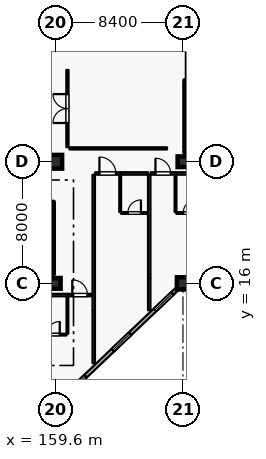
"""IFC4 building model, lengths in metres.
Left out: names, types, materials, properties, quantities, classifications, styles, units other than length and angle.
Written with IfcOpenShell. Run it as: python <this file> out.ifc"""

import sys

from ifc_helpers import new_model, si_unit, direction, frame, frame_2d, origin, origin_2d, place, context, subcontext, project, spatial, rectangle, extrude, element, fill, save


model = new_model("IFC4")
c1 = context("Model", 3, precision=1e-05, world=origin(), true_north=direction((0.0, 1.0)))
c2 = subcontext(c1, "Body", "Model", "MODEL_VIEW")
j1 = project(units=[si_unit("LENGTHUNIT", "METRE"), si_unit("PLANEANGLEUNIT", "RADIAN")], contexts=[c1])
p1 = place(None, origin())
s1 = spatial("IfcSite", under=j1, at=p1, CompositionType="ELEMENT")
p2 = place(p1, origin())
s2 = spatial("IfcBuilding", under=s1, at=p2, CompositionType="ELEMENT")
p3 = place(p2, frame((0.0, 0.0, 11.4)))
s3 = spatial("IfcBuildingStorey", under=s2, at=p3, CompositionType="ELEMENT", Elevation=11.4)
p4 = place(p3, frame((159.6, 24.0, 0.0), z_axis=(0.0, 0.0, 1.0), x_axis=(1.0, 0.0, 0.0)))
e1 = element("IfcColumn", 1, at=p4, inside=s3, PredefinedType="COLUMN", context=c2, shape_type="SweptSolid", body=[
    extrude(rectangle(XDim=0.9, YDim=0.9, at=origin_2d()), origin(), (0.0, 0.0, 1.0), 4.8),
])
p5 = place(p3, frame((168.0, 16.0, 0.0), z_axis=(0.0, 0.0, 1.0), x_axis=(1.0, 0.0, 0.0)))
e2 = element("IfcColumn", 2, at=p5, inside=s3, PredefinedType="COLUMN", context=c2, shape_type="SweptSolid", body=[
    extrude(rectangle(XDim=0.8, YDim=0.8, at=origin_2d()), origin(), (0.0, 0.0, 1.0), 4.8),
])
for number, where, z_axis, x_axis in (
    (3, (159.6, 16.0, 0.0), (0.0, 0.0, 1.0), (1.0, 0.0, 0.0)),
    (4, (168.0, 24.0, 0.0), (0.0, 0.0, 1.0), (1.0, 0.0, 0.0)),
):
    element("IfcColumn", number, at=place(p3, frame(where, z_axis=z_axis, x_axis=x_axis)), inside=s3, PredefinedType="COLUMN", context=c2, shape_type="SweptSolid", body=[
        extrude(rectangle(XDim=0.7, YDim=0.7, at=origin_2d()), origin(), (0.0, 0.0, 1.0), 4.8),
    ])
p6 = place(p3, frame((167.6, 15.619, 0.0), z_axis=(0.0, 0.0, 1.0), x_axis=(-0.724156739794, -0.689635422677, 0.0)))
e5 = element("IfcWall", 5, at=p6, inside=s3, PredefinedType="SOLIDWALL", context=c2, shape_type="SweptSolid", body=[
    extrude(rectangle(XDim=10.495, YDim=0.24, at=frame_2d((5.248, 0.0))), origin(), (0.0, 0.0, 1.0), 4.13),
])
p7 = place(p6, frame((0.388, 0.0, 0.8)))
e6 = element("IfcOpeningElement", 6, at=p7, cuts=e5, PredefinedType="OPENING", context=c2, shape_type="SweptSolid", body=[
    extrude(rectangle(XDim=1.6, YDim=1.6, at=frame_2d((0.8, 0.8))), frame((0.0, 0.13, 0.0), z_axis=(0.0, -1.0, 0.0), x_axis=(1.0, 0.0, 0.0)), (0.0, 0.0, 1.0), 0.26),
])
p8 = place(p6, frame((4.234, 0.0, 0.8)))
e7 = element("IfcOpeningElement", 7, at=p8, cuts=e5, PredefinedType="OPENING", context=c2, shape_type="SweptSolid", body=[
    extrude(rectangle(XDim=1.6, YDim=1.6, at=frame_2d((0.8, 0.8))), frame((0.0, 0.13, 0.0), z_axis=(0.0, -1.0, 0.0), x_axis=(1.0, 0.0, 0.0)), (0.0, 0.0, 1.0), 0.26),
])
p9 = place(p6, frame((8.294, 0.0, 0.8)))
e8 = element("IfcOpeningElement", 8, at=p9, cuts=e5, PredefinedType="OPENING", context=c2, shape_type="SweptSolid", body=[
    extrude(rectangle(XDim=1.6, YDim=1.6, at=frame_2d((0.8, 0.8))), frame((0.0, 0.13, 0.0), z_axis=(0.0, -1.0, 0.0), x_axis=(1.0, 0.0, 0.0)), (0.0, 0.0, 1.0), 0.26),
])
p10 = place(p3, frame((151.3, 16.8, 0.0), z_axis=(0.0, 0.0, 1.0), x_axis=(1.0, 0.0, 0.0)))
e9 = element("IfcWall", 9, at=p10, inside=s3, PredefinedType="SHEAR", context=c2, shape_type="SweptSolid", body=[
    extrude(rectangle(XDim=8.2, YDim=0.4, at=frame_2d((4.1, 0.0))), origin(), (0.0, 0.0, 1.0), 4.535),
])
p11 = place(p3, frame((159.3, 17.005, 0.0), z_axis=(0.0, 0.0, 1.0), x_axis=(0.0, 1.0, 0.0)))
e10 = element("IfcWall", 10, at=p11, inside=s3, PredefinedType="SHEAR", context=c2, shape_type="SweptSolid", body=[
    extrude(rectangle(XDim=3.95, YDim=0.4, at=frame_2d((1.975, 0.0))), origin(), (0.0, 0.0, 1.0), 4.535),
])
p12 = place(p3, frame((151.3, 21.16, 0.0), z_axis=(0.0, 0.0, 1.0), x_axis=(1.0, 0.0, 0.0)))
e11 = element("IfcWall", 11, at=p12, inside=s3, PredefinedType="SHEAR", context=c2, shape_type="SweptSolid", body=[
    extrude(rectangle(XDim=8.2, YDim=0.4, at=frame_2d((4.1, 0.0))), origin(), (0.0, 0.0, 1.0), 4.535),
])
p13 = place(p12, frame((0.43, 0.0, 0.0)))
e12 = element("IfcOpeningElement", 12, at=p13, cuts=e11, PredefinedType="OPENING", context=c2, shape_type="SweptSolid", body=[
    extrude(rectangle(XDim=1.16, YDim=2.2, at=frame_2d((0.58, 1.1))), frame((0.0, 0.21, 0.0), z_axis=(0.0, -1.0, 0.0), x_axis=(1.0, 0.0, 0.0)), (0.0, 0.0, 1.0), 0.42),
])
p14 = place(p3, frame((168.1, 24.8, 0.0), z_axis=(0.0, 0.0, 1.0), x_axis=(1.0, 0.0, 0.0)))
e13 = element("IfcWall", 13, at=p14, inside=s3, PredefinedType="SHEAR", context=c2, shape_type="SweptSolid", body=[
    extrude(rectangle(XDim=8.2, YDim=0.4, at=frame_2d((4.1, 0.0))), origin(), (0.0, 0.0, 1.0), 4.535),
])
p15 = place(p3, frame((168.1, 29.16, 0.0), z_axis=(0.0, 0.0, 1.0), x_axis=(1.0, 0.0, 0.0)))
e14 = element("IfcWall", 14, at=p15, inside=s3, PredefinedType="SHEAR", context=c2, shape_type="SweptSolid", body=[
    extrude(rectangle(XDim=8.2, YDim=0.4, at=frame_2d((4.1, 0.0))), origin(), (0.0, 0.0, 1.0), 4.535),
])
p16 = place(p15, frame((0.43, 0.0, 0.0)))
e15 = element("IfcOpeningElement", 15, at=p16, cuts=e14, PredefinedType="OPENING", context=c2, shape_type="SweptSolid", body=[
    extrude(rectangle(XDim=1.16, YDim=2.2, at=frame_2d((0.58, 1.1))), frame((0.0, 0.21, 0.0), z_axis=(0.0, -1.0, 0.0), x_axis=(1.0, 0.0, 0.0)), (0.0, 0.0, 1.0), 0.42),
])
p17 = place(p3, frame((168.3, 25.005, 0.0), z_axis=(0.0, 0.0, 1.0), x_axis=(0.0, 1.0, 0.0)))
e16 = element("IfcWall", 16, at=p17, inside=s3, PredefinedType="SHEAR", context=c2, shape_type="SweptSolid", body=[
    extrude(rectangle(XDim=3.95, YDim=0.4, at=frame_2d((1.975, 0.0))), origin(), (0.0, 0.0, 1.0), 4.535),
])
p18 = place(p3, frame((168.3, 29.365, 0.0), z_axis=(0.0, 0.0, 1.0), x_axis=(0.0, 1.0, 0.0)))
e17 = element("IfcWall", 17, at=p18, inside=s3, PredefinedType="PARTITIONING", context=c2, shape_type="SweptSolid", body=[
    extrude(rectangle(XDim=2.92, YDim=0.22, at=frame_2d((1.46, 0.0))), origin(), (0.0, 0.0, 1.0), 4.535),
])
p19 = place(p3, frame((158.58, 15.23, 0.0), z_axis=(0.0, 0.0, 1.0), x_axis=(1.0, 0.0, 0.0)))
e18 = element("IfcWall", 18, at=p19, inside=s3, PredefinedType="PARTITIONING", context=c2, shape_type="SweptSolid", body=[
    extrude(rectangle(XDim=1.81, YDim=0.16, at=frame_2d((0.905, 0.0))), origin(), (0.0, 0.0, 1.0), 4.535),
])
p20 = place(p3, frame((160.4, 15.23, 0.0), z_axis=(0.0, 0.0, 1.0), x_axis=(1.0, 0.0, 0.0)))
e19 = element("IfcWall", 19, at=p20, inside=s3, PredefinedType="PARTITIONING", context=c2, shape_type="SweptSolid", body=[
    extrude(rectangle(XDim=1.64, YDim=0.16, at=frame_2d((0.82, 0.0))), origin(), (0.0, 0.0, 1.0), 4.535),
])
p21 = place(p20, frame((0.32, 0.0, 0.0)))
e20 = element("IfcOpeningElement", 20, at=p21, cuts=e19, PredefinedType="OPENING", context=c2, shape_type="SweptSolid", body=[
    extrude(rectangle(XDim=1.0, YDim=2.25, at=frame_2d((0.5, 1.125))), frame((0.0, 0.09, 0.0), z_axis=(0.0, -1.0, 0.0), x_axis=(1.0, 0.0, 0.0)), (0.0, 0.0, 1.0), 0.18),
])
p22 = place(p3, frame((160.4, 12.69, 0.0), z_axis=(0.0, 0.0, 1.0), x_axis=(0.0, 1.0, 0.0)))
e21 = element("IfcWall", 21, at=p22, inside=s3, PredefinedType="PARTITIONING", context=c2, shape_type="SweptSolid", body=[
    extrude(rectangle(XDim=2.45, YDim=0.115, at=frame_2d((1.225, 0.0))), origin(), (0.0, 0.0, 1.0), 4.535),
])
p23 = place(p3, frame((158.59, 12.63, 0.0), z_axis=(0.0, 0.0, 1.0), x_axis=(1.0, 0.0, 0.0)))
e22 = element("IfcWall", 22, at=p23, inside=s3, PredefinedType="PARTITIONING", context=c2, shape_type="SweptSolid", body=[
    extrude(rectangle(XDim=1.75, YDim=0.115, at=frame_2d((0.875, 0.0))), origin(), (0.0, 0.0, 1.0), 4.535),
])
p24 = place(p23, frame((0.445, 0.0, 0.0)))
e23 = element("IfcOpeningElement", 23, at=p24, cuts=e22, PredefinedType="OPENING", context=c2, shape_type="SweptSolid", body=[
    extrude(rectangle(XDim=0.86, YDim=2.12, at=frame_2d((0.43, 1.06))), frame((0.0, 0.067, 0.0), z_axis=(0.0, -1.0, 0.0), x_axis=(1.0, 0.0, 0.0)), (0.0, 0.0, 1.0), 0.135),
])
p25 = place(p3, frame((162.13, 10.75, 0.0), z_axis=(0.0, 0.0, 1.0), x_axis=(0.0, 1.0, 0.0)))
e24 = element("IfcWall", 24, at=p25, inside=s3, PredefinedType="PARTITIONING", context=c2, shape_type="SweptSolid", body=[
    extrude(rectangle(XDim=3.47, YDim=0.16, at=frame_2d((1.735, 0.0))), origin(), (0.0, 0.0, 1.0), 4.535),
])
p26 = place(p3, frame((162.22, 23.23, 0.0), z_axis=(0.0, 0.0, 1.0), x_axis=(1.0, 0.0, 0.0)))
e25 = element("IfcWall", 25, at=p26, inside=s3, PredefinedType="PARTITIONING", context=c2, shape_type="SweptSolid", body=[
    extrude(rectangle(XDim=1.65, YDim=0.16, at=frame_2d((0.825, 0.0))), origin(), (0.0, 0.0, 1.0), 4.535),
])
p27 = place(p26, frame((0.285, 0.0, 0.0)))
e26 = element("IfcOpeningElement", 26, at=p27, cuts=e25, PredefinedType="OPENING", context=c2, shape_type="SweptSolid", body=[
    extrude(rectangle(XDim=1.08, YDim=2.3, at=frame_2d((0.54, 1.15))), frame((0.0, 0.09, 0.0), z_axis=(0.0, -1.0, 0.0), x_axis=(1.0, 0.0, 0.0)), (0.0, 0.0, 1.0), 0.18),
])
p28 = place(p3, frame((163.88, 23.23, 0.0), z_axis=(0.0, 0.0, 1.0), x_axis=(1.0, 0.0, 0.0)))
e27 = element("IfcWall", 27, at=p28, inside=s3, PredefinedType="PARTITIONING", context=c2, shape_type="SweptSolid", body=[
    extrude(rectangle(XDim=1.81, YDim=0.16, at=frame_2d((0.905, 0.0))), origin(), (0.0, 0.0, 1.0), 4.535),
])
p29 = place(p3, frame((163.87, 20.69, 0.0), z_axis=(0.0, 0.0, 1.0), x_axis=(0.0, 1.0, 0.0)))
e28 = element("IfcWall", 28, at=p29, inside=s3, PredefinedType="PARTITIONING", context=c2, shape_type="SweptSolid", body=[
    extrude(rectangle(XDim=2.45, YDim=0.115, at=frame_2d((1.225, 0.0))), origin(), (0.0, 0.0, 1.0), 4.535),
])
p30 = place(p3, frame((163.93, 20.63, 0.0), z_axis=(0.0, 0.0, 1.0), x_axis=(1.0, 0.0, 0.0)))
e29 = element("IfcWall", 29, at=p30, inside=s3, PredefinedType="PARTITIONING", context=c2, shape_type="SweptSolid", body=[
    extrude(rectangle(XDim=1.75, YDim=0.115, at=frame_2d((0.875, 0.0))), origin(), (0.0, 0.0, 1.0), 4.535),
])
p31 = place(p30, frame((0.445, 0.0, 0.0)))
e30 = element("IfcOpeningElement", 30, at=p31, cuts=e29, PredefinedType="OPENING", context=c2, shape_type="SweptSolid", body=[
    extrude(rectangle(XDim=0.86, YDim=2.12, at=frame_2d((0.43, 1.06))), frame((0.0, 0.067, 0.0), z_axis=(0.0, -1.0, 0.0), x_axis=(1.0, 0.0, 0.0)), (0.0, 0.0, 1.0), 0.135),
])
p32 = place(p3, frame((162.13, 14.23, 0.0), z_axis=(0.0, 0.0, 1.0), x_axis=(0.0, 1.0, 0.0)))
e31 = element("IfcWall", 31, at=p32, inside=s3, PredefinedType="PARTITIONING", context=c2, shape_type="SweptSolid", body=[
    extrude(rectangle(XDim=8.91, YDim=0.16, at=frame_2d((4.455, 0.0))), origin(), (0.0, 0.0, 1.0), 4.535),
])
p33 = place(p3, frame((165.78, 14.23, 0.0), z_axis=(0.0, 0.0, 1.0), x_axis=(0.0, 1.0, 0.0)))
e32 = element("IfcWall", 32, at=p33, inside=s3, PredefinedType="PARTITIONING", context=c2, shape_type="SweptSolid", body=[
    extrude(rectangle(XDim=2.1, YDim=0.16, at=frame_2d((1.05, 0.0))), origin(), (0.0, 0.0, 1.0), 4.535),
])
p34 = place(p3, frame((165.87, 23.23, 0.0), z_axis=(0.0, 0.0, 1.0), x_axis=(1.0, 0.0, 0.0)))
e33 = element("IfcWall", 33, at=p34, inside=s3, PredefinedType="PARTITIONING", context=c2, shape_type="SweptSolid", body=[
    extrude(rectangle(XDim=1.64, YDim=0.16, at=frame_2d((0.82, 0.0))), origin(), (0.0, 0.0, 1.0), 4.535),
])
p35 = place(p34, frame((0.32, 0.0, 0.0)))
e34 = element("IfcOpeningElement", 34, at=p35, cuts=e33, PredefinedType="OPENING", context=c2, shape_type="SweptSolid", body=[
    extrude(rectangle(XDim=1.0, YDim=2.25, at=frame_2d((0.5, 1.125))), frame((0.0, 0.09, 0.0), z_axis=(0.0, -1.0, 0.0), x_axis=(1.0, 0.0, 0.0)), (0.0, 0.0, 1.0), 0.18),
])
p36 = place(p3, frame((167.52, 23.23, 0.0), z_axis=(0.0, 0.0, 1.0), x_axis=(1.0, 0.0, 0.0)))
e35 = element("IfcWall", 35, at=p36, inside=s3, PredefinedType="PARTITIONING", context=c2, shape_type="SweptSolid", body=[
    extrude(rectangle(XDim=1.81, YDim=0.16, at=frame_2d((0.905, 0.0))), origin(), (0.0, 0.0, 1.0), 4.535),
])
p37 = place(p3, frame((167.51, 20.69, 0.0), z_axis=(0.0, 0.0, 1.0), x_axis=(0.0, 1.0, 0.0)))
e36 = element("IfcWall", 36, at=p37, inside=s3, PredefinedType="PARTITIONING", context=c2, shape_type="SweptSolid", body=[
    extrude(rectangle(XDim=2.45, YDim=0.115, at=frame_2d((1.225, 0.0))), origin(), (0.0, 0.0, 1.0), 4.535),
])
p38 = place(p3, frame((167.57, 20.63, 0.0), z_axis=(0.0, 0.0, 1.0), x_axis=(1.0, 0.0, 0.0)))
e37 = element("IfcWall", 37, at=p38, inside=s3, PredefinedType="PARTITIONING", context=c2, shape_type="SweptSolid", body=[
    extrude(rectangle(XDim=1.75, YDim=0.115, at=frame_2d((0.875, 0.0))), origin(), (0.0, 0.0, 1.0), 4.535),
])
p39 = place(p38, frame((0.445, 0.0, 0.0)))
e38 = element("IfcOpeningElement", 38, at=p39, cuts=e37, PredefinedType="OPENING", context=c2, shape_type="SweptSolid", body=[
    extrude(rectangle(XDim=0.86, YDim=2.12, at=frame_2d((0.43, 1.06))), frame((0.0, 0.067, 0.0), z_axis=(0.0, -1.0, 0.0), x_axis=(1.0, 0.0, 0.0)), (0.0, 0.0, 1.0), 0.135),
])
p40 = place(p3, frame((165.78, 16.34, 0.0), z_axis=(0.0, 0.0, 1.0), x_axis=(0.0, 1.0, 0.0)))
e39 = element("IfcWall", 39, at=p40, inside=s3, PredefinedType="PARTITIONING", context=c2, shape_type="SweptSolid", body=[
    extrude(rectangle(XDim=6.8, YDim=0.16, at=frame_2d((3.4, 0.0))), origin(), (0.0, 0.0, 1.0), 4.535),
])
p41 = place(p3, frame((160.4, 24.96, 0.0), z_axis=(0.0, 0.0, 1.0), x_axis=(0.0, 1.0, 0.0)))
e40 = element("IfcWall", 40, at=p41, inside=s3, PredefinedType="PARTITIONING", context=c2, shape_type="SweptSolid", body=[
    extrude(rectangle(XDim=5.08, YDim=0.14, at=frame_2d((2.54, 0.0))), origin(), (0.0, 0.0, 1.0), 4.535),
])
p42 = place(p41, frame((1.59, 0.0, 0.0)))
e41 = element("IfcOpeningElement", 41, at=p42, cuts=e40, PredefinedType="OPENING", context=c2, shape_type="SweptSolid", body=[
    extrude(rectangle(XDim=1.9, YDim=2.4, at=frame_2d((0.95, 1.2))), frame((0.0, 0.08, 0.0), z_axis=(0.0, -1.0, 0.0), x_axis=(1.0, 0.0, 0.0)), (0.0, 0.0, 1.0), 0.16),
])
p43 = place(p3, frame((160.54, 24.88, 0.0), z_axis=(0.0, 0.0, 1.0), x_axis=(1.0, 0.0, 0.0)))
e42 = element("IfcWall", 42, at=p43, inside=s3, PredefinedType="PARTITIONING", context=c2, shape_type="SweptSolid", body=[
    extrude(rectangle(XDim=6.41, YDim=0.14, at=frame_2d((3.205, 0.0))), origin(), (0.0, 0.0, 1.0), 4.535),
])
p44 = place(p7, origin())
e43 = element("IfcWindow", 43, at=p44, inside=s3, PartitioningType="SINGLE_PANEL", PredefinedType="WINDOW", context=c2, shape_type="SweptSolid", body=[
    extrude(rectangle(XDim=1.6, YDim=1.6, at=frame_2d((0.8, 0.8))), frame((0.0, 0.03, 0.0), z_axis=(0.0, -1.0, 0.0), x_axis=(1.0, 0.0, 0.0)), (0.0, 0.0, 1.0), 0.06),
])
fill(e6, e43)
p45 = place(p8, origin())
e44 = element("IfcWindow", 44, at=p45, inside=s3, PartitioningType="SINGLE_PANEL", PredefinedType="WINDOW", context=c2, shape_type="SweptSolid", body=[
    extrude(rectangle(XDim=1.6, YDim=1.6, at=frame_2d((0.8, 0.8))), frame((0.0, 0.03, 0.0), z_axis=(0.0, -1.0, 0.0), x_axis=(1.0, 0.0, 0.0)), (0.0, 0.0, 1.0), 0.06),
])
fill(e7, e44)
p46 = place(p9, origin())
e45 = element("IfcWindow", 45, at=p46, inside=s3, PartitioningType="SINGLE_PANEL", PredefinedType="WINDOW", context=c2, shape_type="SweptSolid", body=[
    extrude(rectangle(XDim=1.6, YDim=1.6, at=frame_2d((0.8, 0.8))), frame((0.0, 0.03, 0.0), z_axis=(0.0, -1.0, 0.0), x_axis=(1.0, 0.0, 0.0)), (0.0, 0.0, 1.0), 0.06),
])
fill(e8, e45)
p47 = place(p21, origin())
e46 = element("IfcDoor", 46, at=p47, inside=s3, OperationType="SINGLE_SWING_LEFT", PredefinedType="DOOR", context=c2, shape_type="SweptSolid", body=[
    extrude(rectangle(XDim=1.0, YDim=2.25, at=frame_2d((0.5, 1.125))), frame((0.0, 0.025, 0.0), z_axis=(0.0, -1.0, 0.0), x_axis=(1.0, 0.0, 0.0)), (0.0, 0.0, 1.0), 0.05),
])
fill(e20, e46)
p48 = place(p24, origin())
e47 = element("IfcDoor", 47, at=p48, inside=s3, OperationType="SINGLE_SWING_RIGHT", PredefinedType="DOOR", context=c2, shape_type="SweptSolid", body=[
    extrude(rectangle(XDim=0.86, YDim=2.12, at=frame_2d((0.43, 1.06))), frame((0.0, 0.025, 0.0), z_axis=(0.0, -1.0, 0.0), x_axis=(1.0, 0.0, 0.0)), (0.0, 0.0, 1.0), 0.05),
])
fill(e23, e47)
p49 = place(p27, origin())
e48 = element("IfcDoor", 48, at=p49, inside=s3, OperationType="SINGLE_SWING_LEFT", PredefinedType="DOOR", context=c2, shape_type="SweptSolid", body=[
    extrude(rectangle(XDim=1.08, YDim=2.3, at=frame_2d((0.54, 1.15))), frame((0.0, 0.025, 0.0), z_axis=(0.0, -1.0, 0.0), x_axis=(1.0, 0.0, 0.0)), (0.0, 0.0, 1.0), 0.05),
])
fill(e26, e48)
p50 = place(p31, origin())
e49 = element("IfcDoor", 49, at=p50, inside=s3, OperationType="SINGLE_SWING_RIGHT", PredefinedType="DOOR", context=c2, shape_type="SweptSolid", body=[
    extrude(rectangle(XDim=0.86, YDim=2.12, at=frame_2d((0.43, 1.06))), frame((0.0, 0.025, 0.0), z_axis=(0.0, -1.0, 0.0), x_axis=(1.0, 0.0, 0.0)), (0.0, 0.0, 1.0), 0.05),
])
fill(e30, e49)
p51 = place(p35, origin())
e50 = element("IfcDoor", 50, at=p51, inside=s3, OperationType="SINGLE_SWING_LEFT", PredefinedType="DOOR", context=c2, shape_type="SweptSolid", body=[
    extrude(rectangle(XDim=1.0, YDim=2.25, at=frame_2d((0.5, 1.125))), frame((0.0, 0.025, 0.0), z_axis=(0.0, -1.0, 0.0), x_axis=(1.0, 0.0, 0.0)), (0.0, 0.0, 1.0), 0.05),
])
fill(e34, e50)
p52 = place(p39, origin())
e51 = element("IfcDoor", 51, at=p52, inside=s3, OperationType="SINGLE_SWING_RIGHT", PredefinedType="DOOR", context=c2, shape_type="SweptSolid", body=[
    extrude(rectangle(XDim=0.86, YDim=2.12, at=frame_2d((0.43, 1.06))), frame((0.0, 0.025, 0.0), z_axis=(0.0, -1.0, 0.0), x_axis=(1.0, 0.0, 0.0)), (0.0, 0.0, 1.0), 0.05),
])
fill(e38, e51)
p53 = place(p42, origin())
e52 = element("IfcDoor", 52, at=p53, inside=s3, OperationType="DOUBLE_DOOR_SINGLE_SWING", PredefinedType="DOOR", context=c2, shape_type="SweptSolid", body=[
    extrude(rectangle(XDim=1.9, YDim=2.4, at=frame_2d((0.95, 1.2))), frame((0.0, 0.025, 0.0), z_axis=(0.0, -1.0, 0.0), x_axis=(1.0, 0.0, 0.0)), (0.0, 0.0, 1.0), 0.05),
])
fill(e41, e52)
save(model, sys.argv[1])
